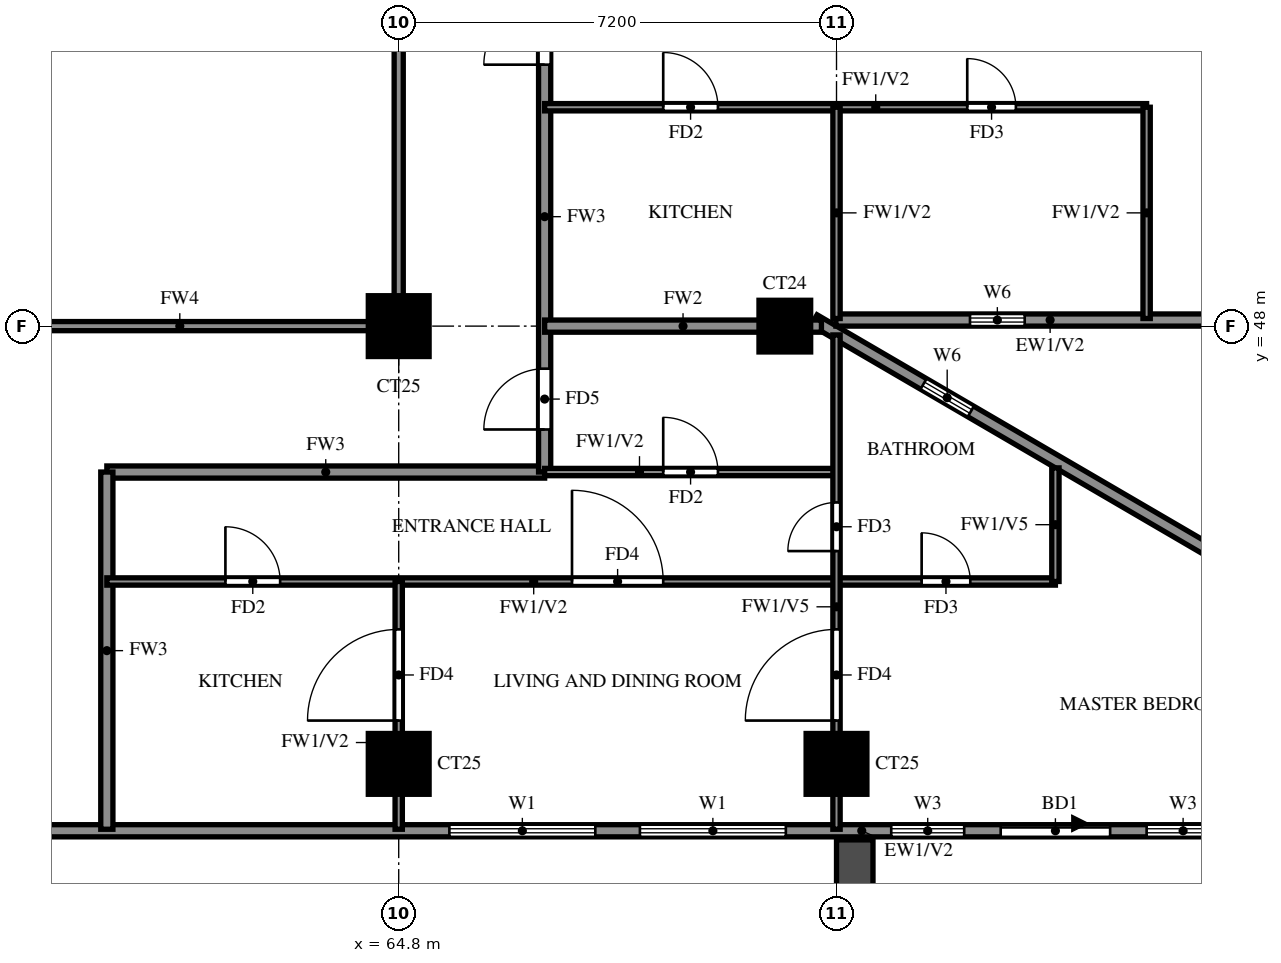
"""IFC4 building model, lengths in metres.
Left out: names, types, materials, properties, quantities, classifications, styles, units other than length and angle.
Written with IfcOpenShell. Run it as: python <this file> out.ifc"""

import sys

from ifc_helpers import new_model, si_unit, direction, frame, frame_2d, origin, origin_2d, place, context, subcontext, project, spatial, rectangle, extrude, source, transform, mapped, element, fill, save


model = new_model("IFC4")
c1 = context("Model", 3, precision=1e-05, world=origin(), true_north=direction((0.0, 1.0)))
c2 = subcontext(c1, "Body", "Model", "MODEL_VIEW")
j1 = project(units=[si_unit("LENGTHUNIT", "METRE"), si_unit("PLANEANGLEUNIT", "RADIAN")], contexts=[c1])
p1 = place(None, origin())
s1 = spatial("IfcSite", under=j1, at=p1, CompositionType="ELEMENT")
p2 = place(p1, origin())
s2 = spatial("IfcBuilding", under=s1, at=p2, CompositionType="ELEMENT")
p3 = place(p2, frame((0.0, 0.0, 150.0)))
s3 = spatial("IfcBuildingStorey", under=s2, at=p3, CompositionType="ELEMENT", Elevation=150.0)
m1 = source(origin(), c2, "Body", "SweptSolid", [
    extrude(rectangle(XDim=1.0, YDim=1.0, at=origin_2d()), origin(), (0.0, 0.0, 1.0), 3.2),
])
for number, where, z_axis, x_axis in (
    (1, (64.8, 40.8, 0.0), (0.0, 0.0, 1.0), (1.0, 0.0, 0.0)),
    (2, (72.0, 40.8, 0.0), (0.0, 0.0, 1.0), (1.0, 0.0, 0.0)),
    (3, (64.8, 48.0, 0.0), (0.0, 0.0, 1.0), (1.0, 0.0, 0.0)),
):
    element("IfcColumn", number, at=place(p3, frame(where, z_axis=z_axis, x_axis=x_axis)), inside=s3, PredefinedType="COLUMN", context=c2, shape_type="MappedRepresentation", body=[
        mapped(m1, transform((0.0, 0.0, 0.0))),
    ])
m2 = source(origin(), c2, "Body", "SweptSolid", [
    extrude(rectangle(XDim=0.85, YDim=0.85, at=origin_2d()), origin(), (0.0, 0.0, 1.0), 3.2),
])
p4 = place(p3, frame((71.15, 48.0, 0.0), z_axis=(0.0, 0.0, 1.0), x_axis=(1.0, 0.0, 0.0)))
e4 = element("IfcColumn", 4, at=p4, inside=s3, PredefinedType="COLUMN", context=c2, shape_type="MappedRepresentation", body=[
    mapped(m2, transform((0.0, 0.0, 0.0))),
])
p5 = place(p3, frame((85.719, 39.881, 0.0), z_axis=(0.0, 0.0, 1.0), x_axis=(-0.86377618652, 0.503875678716, 0.0)))
e5 = element("IfcWall", 5, at=p5, inside=s3, PredefinedType="SOLIDWALL", context=c2, shape_type="SweptSolid", body=[
    extrude(rectangle(XDim=16.311, YDim=0.2, at=frame_2d((8.156, 0.0))), origin(), (0.0, 0.0, 1.0), 3.2),
])
p6 = place(p5, frame((13.326, 0.0, 1.5)))
e6 = element("IfcOpeningElement", 6, at=p6, cuts=e5, PredefinedType="OPENING", context=c2, shape_type="SweptSolid", body=[
    extrude(rectangle(XDim=0.9, YDim=0.9, at=frame_2d((0.45, 0.45))), frame((0.0, 0.11, 0.0), z_axis=(0.0, -1.0, 0.0), x_axis=(1.0, 0.0, 0.0)), (0.0, 0.0, 1.0), 0.22),
])
p7 = place(p3, frame((71.99, 48.1, 0.0), z_axis=(0.0, 0.0, 1.0), x_axis=(1.0, 0.0, 0.0)))
e7 = element("IfcWall", 7, at=p7, inside=s3, PredefinedType="SOLIDWALL", context=c2, shape_type="SweptSolid", body=[
    extrude(rectangle(XDim=6.71, YDim=0.2, at=frame_2d((3.355, 0.0))), origin(), (0.0, 0.0, 1.0), 3.2),
])
p8 = place(p7, frame((2.205, 0.0, 1.5)))
e8 = element("IfcOpeningElement", 8, at=p8, cuts=e7, PredefinedType="OPENING", context=c2, shape_type="SweptSolid", body=[
    extrude(rectangle(XDim=0.9, YDim=0.9, at=frame_2d((0.45, 0.45))), frame((0.0, 0.11, 0.0), z_axis=(0.0, -1.0, 0.0), x_axis=(1.0, 0.0, 0.0)), (0.0, 0.0, 1.0), 0.22),
])
p9 = place(p3, frame((58.8, 39.7, 0.0), z_axis=(0.0, 0.0, 1.0), x_axis=(1.0, 0.0, 0.0)))
e9 = element("IfcWall", 9, at=p9, inside=s3, PredefinedType="SOLIDWALL", context=c2, shape_type="SweptSolid", body=[
    extrude(rectangle(XDim=27.23, YDim=0.2, at=frame_2d((13.615, 0.0))), origin(), (0.0, 0.0, 1.0), 3.2),
])
p10 = place(p9, frame((15.9, 0.0, 0.0)))
e10 = element("IfcOpeningElement", 10, at=p10, cuts=e9, PredefinedType="OPENING", context=c2, shape_type="SweptSolid", body=[
    extrude(rectangle(XDim=1.8, YDim=2.4, at=frame_2d((0.9, 1.2))), frame((0.0, 0.11, 0.0), z_axis=(0.0, -1.0, 0.0), x_axis=(1.0, 0.0, 0.0)), (0.0, 0.0, 1.0), 0.22),
])
p11 = place(p9, frame((6.833, 0.0, 0.6)))
e11 = element("IfcOpeningElement", 11, at=p11, cuts=e9, PredefinedType="OPENING", context=c2, shape_type="SweptSolid", body=[
    extrude(rectangle(XDim=2.4, YDim=2.4, at=frame_2d((1.2, 1.2))), frame((0.0, 0.11, 0.0), z_axis=(0.0, -1.0, 0.0), x_axis=(1.0, 0.0, 0.0)), (0.0, 0.0, 1.0), 0.22),
])
p12 = place(p9, frame((9.967, 0.0, 0.6)))
e12 = element("IfcOpeningElement", 12, at=p12, cuts=e9, PredefinedType="OPENING", context=c2, shape_type="SweptSolid", body=[
    extrude(rectangle(XDim=2.4, YDim=2.4, at=frame_2d((1.2, 1.2))), frame((0.0, 0.11, 0.0), z_axis=(0.0, -1.0, 0.0), x_axis=(1.0, 0.0, 0.0)), (0.0, 0.0, 1.0), 0.22),
])
p13 = place(p9, frame((14.1, 0.0, 0.6)))
e13 = element("IfcOpeningElement", 13, at=p13, cuts=e9, PredefinedType="OPENING", context=c2, shape_type="SweptSolid", body=[
    extrude(rectangle(XDim=1.2, YDim=2.4, at=frame_2d((0.6, 1.2))), frame((0.0, 0.11, 0.0), z_axis=(0.0, -1.0, 0.0), x_axis=(1.0, 0.0, 0.0)), (0.0, 0.0, 1.0), 0.22),
])
p14 = place(p9, frame((18.3, 0.0, 0.6)))
e14 = element("IfcOpeningElement", 14, at=p14, cuts=e9, PredefinedType="OPENING", context=c2, shape_type="SweptSolid", body=[
    extrude(rectangle(XDim=1.2, YDim=2.4, at=frame_2d((0.6, 1.2))), frame((0.0, 0.11, 0.0), z_axis=(0.0, -1.0, 0.0), x_axis=(1.0, 0.0, 0.0)), (0.0, 0.0, 1.0), 0.22),
])
p15 = place(p9, frame((21.551, 0.0, 0.6)))
e15 = element("IfcOpeningElement", 15, at=p15, cuts=e9, PredefinedType="OPENING", context=c2, shape_type="SweptSolid", body=[
    extrude(rectangle(XDim=2.4, YDim=2.4, at=frame_2d((1.2, 1.2))), frame((0.0, 0.11, 0.0), z_axis=(0.0, -1.0, 0.0), x_axis=(1.0, 0.0, 0.0)), (0.0, 0.0, 1.0), 0.22),
])
p16 = place(p9, frame((25.99, 0.0, 0.6)))
e16 = element("IfcOpeningElement", 16, at=p16, cuts=e9, PredefinedType="OPENING", context=c2, shape_type="SweptSolid", body=[
    extrude(rectangle(XDim=0.9, YDim=2.4, at=frame_2d((0.45, 1.2))), frame((0.0, 0.11, 0.0), z_axis=(0.0, -1.0, 0.0), x_axis=(1.0, 0.0, 0.0)), (0.0, 0.0, 1.0), 0.22),
])
p17 = place(p3, frame((72.3, 39.55, 0.0), z_axis=(0.0, 0.0, 1.0), x_axis=(0.0, -1.0, 0.0)))
e17 = element("IfcWall", 17, at=p17, inside=s3, PredefinedType="SOLIDWALL", context=c2, shape_type="SweptSolid", body=[
    extrude(rectangle(XDim=2.65, YDim=0.6, at=frame_2d((1.325, 0.0))), origin(), (0.0, 0.0, 1.0), 2.85),
])
p18 = place(p3, frame((60.0, 45.6, 0.0), z_axis=(0.0, 0.0, 1.0), x_axis=(1.0, 0.0, 0.0)))
e18 = element("IfcWall", 18, at=p18, inside=s3, PredefinedType="SOLIDWALL", context=c2, shape_type="SweptSolid", body=[
    extrude(rectangle(XDim=7.2, YDim=0.2, at=frame_2d((3.6, 0.0))), origin(), (0.0, 0.0, 1.0), 3.2),
])
p19 = place(p3, frame((60.0, 39.725, 0.0), z_axis=(0.0, 0.0, 1.0), x_axis=(0.0, 1.0, 0.0)))
e19 = element("IfcWall", 19, at=p19, inside=s3, PredefinedType="SOLIDWALL", context=c2, shape_type="SweptSolid", body=[
    extrude(rectangle(XDim=5.875, YDim=0.2, at=frame_2d((2.938, 0.0))), origin(), (0.0, 0.0, 1.0), 3.2),
])
p20 = place(p3, frame((67.2, 45.6, 0.0), z_axis=(0.0, 0.0, 1.0), x_axis=(0.0, 1.0, 0.0)))
e20 = element("IfcWall", 20, at=p20, inside=s3, PredefinedType="SOLIDWALL", context=c2, shape_type="SweptSolid", body=[
    extrude(rectangle(XDim=8.4, YDim=0.2, at=frame_2d((4.2, 0.0))), origin(), (0.0, 0.0, 1.0), 3.2),
])
p21 = place(p20, frame((6.7, 0.0, 0.0)))
e21 = element("IfcOpeningElement", 21, at=p21, cuts=e20, PredefinedType="OPENING", context=c2, shape_type="SweptSolid", body=[
    extrude(rectangle(XDim=1.0, YDim=2.1, at=frame_2d((0.5, 1.05))), frame((0.0, 0.11, 0.0), z_axis=(0.0, -1.0, 0.0), x_axis=(1.0, 0.0, 0.0)), (0.0, 0.0, 1.0), 0.22),
])
p22 = place(p20, frame((0.7, 0.0, 0.0)))
e22 = element("IfcOpeningElement", 22, at=p22, cuts=e20, PredefinedType="OPENING", context=c2, shape_type="SweptSolid", body=[
    extrude(rectangle(XDim=1.0, YDim=2.1, at=frame_2d((0.5, 1.05))), frame((0.0, 0.11, 0.0), z_axis=(0.0, -1.0, 0.0), x_axis=(1.0, 0.0, 0.0)), (0.0, 0.0, 1.0), 0.22),
])
p23 = place(p3, frame((67.2, 48.0, 0.0), z_axis=(0.0, 0.0, 1.0), x_axis=(1.0, 0.0, 0.0)))
e23 = element("IfcWall", 23, at=p23, inside=s3, PredefinedType="SOLIDWALL", context=c2, shape_type="SweptSolid", body=[
    extrude(rectangle(XDim=4.552, YDim=0.2, at=frame_2d((2.276, 0.0))), origin(), (0.0, 0.0, 1.0), 3.2),
])
p24 = place(p3, frame((60.0, 43.8, 0.0), z_axis=(0.0, 0.0, 1.0), x_axis=(1.0, 0.0, 0.0)))
e24 = element("IfcWall", 24, at=p24, inside=s3, PredefinedType="PARTITIONING", context=c2, shape_type="SweptSolid", body=[
    extrude(rectangle(XDim=15.6, YDim=0.12, at=frame_2d((7.8, 0.0))), origin(), (0.0, 0.0, 1.0), 3.2),
])
p25 = place(p24, frame((7.65, 0.0, 0.0)))
e25 = element("IfcOpeningElement", 25, at=p25, cuts=e24, PredefinedType="OPENING", context=c2, shape_type="SweptSolid", body=[
    extrude(rectangle(XDim=1.5, YDim=2.1, at=frame_2d((0.75, 1.05))), frame((0.0, 0.07, 0.0), z_axis=(0.0, -1.0, 0.0), x_axis=(1.0, 0.0, 0.0)), (0.0, 0.0, 1.0), 0.14),
])
p26 = place(p24, frame((1.95, 0.0, 0.0)))
e26 = element("IfcOpeningElement", 26, at=p26, cuts=e24, PredefinedType="OPENING", context=c2, shape_type="SweptSolid", body=[
    extrude(rectangle(XDim=0.9, YDim=2.1, at=frame_2d((0.45, 1.05))), frame((0.0, 0.07, 0.0), z_axis=(0.0, -1.0, 0.0), x_axis=(1.0, 0.0, 0.0)), (0.0, 0.0, 1.0), 0.14),
])
p27 = place(p24, frame((13.4, 0.0, 0.0)))
e27 = element("IfcOpeningElement", 27, at=p27, cuts=e24, PredefinedType="OPENING", context=c2, shape_type="SweptSolid", body=[
    extrude(rectangle(XDim=0.8, YDim=2.1, at=frame_2d((0.4, 1.05))), frame((0.0, 0.07, 0.0), z_axis=(0.0, -1.0, 0.0), x_axis=(1.0, 0.0, 0.0)), (0.0, 0.0, 1.0), 0.14),
])
p28 = place(p3, frame((67.2, 45.6, 0.0), z_axis=(0.0, 0.0, 1.0), x_axis=(1.0, 0.0, 0.0)))
e28 = element("IfcWall", 28, at=p28, inside=s3, PredefinedType="PARTITIONING", context=c2, shape_type="SweptSolid", body=[
    extrude(rectangle(XDim=4.8, YDim=0.12, at=frame_2d((2.4, 0.0))), origin(), (0.0, 0.0, 1.0), 3.2),
])
p29 = place(p28, frame((1.95, 0.0, 0.0)))
e29 = element("IfcOpeningElement", 29, at=p29, cuts=e28, PredefinedType="OPENING", context=c2, shape_type="SweptSolid", body=[
    extrude(rectangle(XDim=0.9, YDim=2.1, at=frame_2d((0.45, 1.05))), frame((0.0, 0.07, 0.0), z_axis=(0.0, -1.0, 0.0), x_axis=(1.0, 0.0, 0.0)), (0.0, 0.0, 1.0), 0.14),
])
p30 = place(p3, frame((67.2, 51.6, 0.0), z_axis=(0.0, 0.0, 1.0), x_axis=(1.0, 0.0, 0.0)))
e30 = element("IfcWall", 30, at=p30, inside=s3, PredefinedType="PARTITIONING", context=c2, shape_type="SweptSolid", body=[
    extrude(rectangle(XDim=9.9, YDim=0.12, at=frame_2d((4.95, 0.0))), origin(), (0.0, 0.0, 1.0), 3.2),
])
p31 = place(p30, frame((6.95, 0.0, 0.0)))
e31 = element("IfcOpeningElement", 31, at=p31, cuts=e30, PredefinedType="OPENING", context=c2, shape_type="SweptSolid", body=[
    extrude(rectangle(XDim=0.8, YDim=2.1, at=frame_2d((0.4, 1.05))), frame((0.0, 0.07, 0.0), z_axis=(0.0, -1.0, 0.0), x_axis=(1.0, 0.0, 0.0)), (0.0, 0.0, 1.0), 0.14),
])
p32 = place(p30, frame((1.95, 0.0, 0.0)))
e32 = element("IfcOpeningElement", 32, at=p32, cuts=e30, PredefinedType="OPENING", context=c2, shape_type="SweptSolid", body=[
    extrude(rectangle(XDim=0.9, YDim=2.1, at=frame_2d((0.45, 1.05))), frame((0.0, 0.07, 0.0), z_axis=(0.0, -1.0, 0.0), x_axis=(1.0, 0.0, 0.0)), (0.0, 0.0, 1.0), 0.14),
])
p33 = place(p3, frame((64.8, 39.725, 0.0), z_axis=(0.0, 0.0, 1.0), x_axis=(0.0, 1.0, 0.0)))
e33 = element("IfcWall", 33, at=p33, inside=s3, PredefinedType="PARTITIONING", context=c2, shape_type="SweptSolid", body=[
    extrude(rectangle(XDim=4.075, YDim=0.12, at=frame_2d((2.038, 0.0))), origin(), (0.0, 0.0, 1.0), 3.2),
])
p34 = place(p33, frame((1.788, 0.0, 0.0)))
e34 = element("IfcOpeningElement", 34, at=p34, cuts=e33, PredefinedType="OPENING", context=c2, shape_type="SweptSolid", body=[
    extrude(rectangle(XDim=1.5, YDim=2.1, at=frame_2d((0.75, 1.05))), frame((0.0, 0.07, 0.0), z_axis=(0.0, -1.0, 0.0), x_axis=(1.0, 0.0, 0.0)), (0.0, 0.0, 1.0), 0.14),
])
p35 = place(p3, frame((72.0, 39.725, 0.0), z_axis=(0.0, 0.0, 1.0), x_axis=(0.0, 1.0, 0.0)))
e35 = element("IfcWall", 35, at=p35, inside=s3, PredefinedType="PARTITIONING", context=c2, shape_type="SweptSolid", body=[
    extrude(rectangle(XDim=8.13, YDim=0.12, at=frame_2d((4.065, 0.0))), origin(), (0.0, 0.0, 1.0), 2.3),
])
p36 = place(p35, frame((1.788, 0.0, 0.0)))
e36 = element("IfcOpeningElement", 36, at=p36, cuts=e35, PredefinedType="OPENING", context=c2, shape_type="SweptSolid", body=[
    extrude(rectangle(XDim=1.5, YDim=2.1, at=frame_2d((0.75, 1.05))), frame((0.0, 0.07, 0.0), z_axis=(0.0, -1.0, 0.0), x_axis=(1.0, 0.0, 0.0)), (0.0, 0.0, 1.0), 0.14),
])
p37 = place(p35, frame((4.575, 0.0, 0.0)))
e37 = element("IfcOpeningElement", 37, at=p37, cuts=e35, PredefinedType="OPENING", context=c2, shape_type="SweptSolid", body=[
    extrude(rectangle(XDim=0.8, YDim=2.1, at=frame_2d((0.4, 1.05))), frame((0.0, 0.07, 0.0), z_axis=(0.0, -1.0, 0.0), x_axis=(1.0, 0.0, 0.0)), (0.0, 0.0, 1.0), 0.14),
])
p38 = place(p3, frame((72.0, 48.125, 0.0), z_axis=(0.0, 0.0, 1.0), x_axis=(0.0, 1.0, 0.0)))
e38 = element("IfcWall", 38, at=p38, inside=s3, PredefinedType="PARTITIONING", context=c2, shape_type="SweptSolid", body=[
    extrude(rectangle(XDim=3.475, YDim=0.12, at=frame_2d((1.738, 0.0))), origin(), (0.0, 0.0, 1.0), 3.2),
])
p39 = place(p3, frame((75.6, 43.8, 0.0), z_axis=(0.0, 0.0, 1.0), x_axis=(0.0, 1.0, 0.0)))
e39 = element("IfcWall", 39, at=p39, inside=s3, PredefinedType="PARTITIONING", context=c2, shape_type="SweptSolid", body=[
    extrude(rectangle(XDim=1.868, YDim=0.12, at=frame_2d((0.934, 0.0))), origin(), (0.0, 0.0, 1.0), 2.3),
])
p40 = place(p3, frame((77.1, 48.125, 0.0), z_axis=(0.0, 0.0, 1.0), x_axis=(0.0, 1.0, 0.0)))
e40 = element("IfcWall", 40, at=p40, inside=s3, PredefinedType="PARTITIONING", context=c2, shape_type="SweptSolid", body=[
    extrude(rectangle(XDim=3.475, YDim=0.12, at=frame_2d((1.738, 0.0))), origin(), (0.0, 0.0, 1.0), 3.2),
])
p41 = place(p3, frame((57.6, 48.0, 0.0), z_axis=(0.0, 0.0, 1.0), x_axis=(1.0, 0.0, 0.0)))
e41 = element("IfcWall", 41, at=p41, inside=s3, PredefinedType="SOLIDWALL", context=c2, shape_type="SweptSolid", body=[
    extrude(rectangle(XDim=7.2, YDim=0.15, at=frame_2d((3.6, 0.0))), origin(), (0.0, 0.0, 1.0), 2.3),
])
p42 = place(p3, frame((64.8, 48.0, 0.0), z_axis=(0.0, 0.0, 1.0), x_axis=(0.0, 1.0, 0.0)))
e42 = element("IfcWall", 42, at=p42, inside=s3, PredefinedType="SOLIDWALL", context=c2, shape_type="SweptSolid", body=[
    extrude(rectangle(XDim=14.4, YDim=0.15, at=frame_2d((7.2, 0.0))), origin(), (0.0, 0.0, 1.0), 2.3),
])
p43 = place(p6, origin())
e43 = element("IfcWindow", 43, at=p43, inside=s3, PartitioningType="SINGLE_PANEL", PredefinedType="WINDOW", context=c2, shape_type="SweptSolid", body=[
    extrude(rectangle(XDim=0.9, YDim=0.9, at=frame_2d((0.45, 0.45))), frame((0.0, 0.03, 0.0), z_axis=(0.0, -1.0, 0.0), x_axis=(1.0, 0.0, 0.0)), (0.0, 0.0, 1.0), 0.06),
])
fill(e6, e43)
p44 = place(p8, origin())
e44 = element("IfcWindow", 44, at=p44, inside=s3, PartitioningType="SINGLE_PANEL", PredefinedType="WINDOW", context=c2, shape_type="SweptSolid", body=[
    extrude(rectangle(XDim=0.9, YDim=0.9, at=frame_2d((0.45, 0.45))), frame((0.0, 0.03, 0.0), z_axis=(0.0, -1.0, 0.0), x_axis=(1.0, 0.0, 0.0)), (0.0, 0.0, 1.0), 0.06),
])
fill(e8, e44)
p45 = place(p10, origin())
e45 = element("IfcDoor", 45, at=p45, inside=s3, OperationType="DOUBLE_DOOR_SLIDING", PredefinedType="DOOR", context=c2, shape_type="SweptSolid", body=[
    extrude(rectangle(XDim=1.8, YDim=2.4, at=frame_2d((0.9, 1.2))), frame((0.0, 0.025, 0.0), z_axis=(0.0, -1.0, 0.0), x_axis=(1.0, 0.0, 0.0)), (0.0, 0.0, 1.0), 0.05),
])
fill(e10, e45)
p46 = place(p11, origin())
e46 = element("IfcWindow", 46, at=p46, inside=s3, PartitioningType="DOUBLE_PANEL_VERTICAL", PredefinedType="WINDOW", context=c2, shape_type="SweptSolid", body=[
    extrude(rectangle(XDim=2.4, YDim=2.4, at=frame_2d((1.2, 1.2))), frame((0.0, 0.03, 0.0), z_axis=(0.0, -1.0, 0.0), x_axis=(1.0, 0.0, 0.0)), (0.0, 0.0, 1.0), 0.06),
])
fill(e11, e46)
p47 = place(p12, origin())
e47 = element("IfcWindow", 47, at=p47, inside=s3, PartitioningType="DOUBLE_PANEL_VERTICAL", PredefinedType="WINDOW", context=c2, shape_type="SweptSolid", body=[
    extrude(rectangle(XDim=2.4, YDim=2.4, at=frame_2d((1.2, 1.2))), frame((0.0, 0.03, 0.0), z_axis=(0.0, -1.0, 0.0), x_axis=(1.0, 0.0, 0.0)), (0.0, 0.0, 1.0), 0.06),
])
fill(e12, e47)
p48 = place(p13, origin())
e48 = element("IfcWindow", 48, at=p48, inside=s3, PartitioningType="SINGLE_PANEL", PredefinedType="WINDOW", context=c2, shape_type="SweptSolid", body=[
    extrude(rectangle(XDim=1.2, YDim=2.4, at=frame_2d((0.6, 1.2))), frame((0.0, 0.03, 0.0), z_axis=(0.0, -1.0, 0.0), x_axis=(1.0, 0.0, 0.0)), (0.0, 0.0, 1.0), 0.06),
])
fill(e13, e48)
p49 = place(p14, origin())
e49 = element("IfcWindow", 49, at=p49, inside=s3, PartitioningType="SINGLE_PANEL", PredefinedType="WINDOW", context=c2, shape_type="SweptSolid", body=[
    extrude(rectangle(XDim=1.2, YDim=2.4, at=frame_2d((0.6, 1.2))), frame((0.0, 0.03, 0.0), z_axis=(0.0, -1.0, 0.0), x_axis=(1.0, 0.0, 0.0)), (0.0, 0.0, 1.0), 0.06),
])
fill(e14, e49)
p50 = place(p21, origin())
e50 = element("IfcDoor", 50, at=p50, inside=s3, OperationType="SINGLE_SWING_RIGHT", PredefinedType="DOOR", context=c2, shape_type="SweptSolid", body=[
    extrude(rectangle(XDim=1.0, YDim=2.1, at=frame_2d((0.5, 1.05))), frame((0.0, 0.025, 0.0), z_axis=(0.0, -1.0, 0.0), x_axis=(1.0, 0.0, 0.0)), (0.0, 0.0, 1.0), 0.05),
])
fill(e21, e50)
p51 = place(p31, origin())
e51 = element("IfcDoor", 51, at=p51, inside=s3, OperationType="SINGLE_SWING_RIGHT", PredefinedType="DOOR", context=c2, shape_type="SweptSolid", body=[
    extrude(rectangle(XDim=0.8, YDim=2.1, at=frame_2d((0.4, 1.05))), frame((0.0, 0.025, 0.0), z_axis=(0.0, -1.0, 0.0), x_axis=(1.0, 0.0, 0.0)), (0.0, 0.0, 1.0), 0.05),
])
fill(e31, e51)
p52 = place(p32, origin())
e52 = element("IfcDoor", 52, at=p52, inside=s3, OperationType="SINGLE_SWING_LEFT", PredefinedType="DOOR", context=c2, shape_type="SweptSolid", body=[
    extrude(rectangle(XDim=0.9, YDim=2.1, at=frame_2d((0.45, 1.05))), frame((0.0, 0.025, 0.0), z_axis=(0.0, -1.0, 0.0), x_axis=(1.0, 0.0, 0.0)), (0.0, 0.0, 1.0), 0.05),
])
fill(e32, e52)
p53 = place(p34, origin())
e53 = element("IfcDoor", 53, at=p53, inside=s3, OperationType="SINGLE_SWING_RIGHT", PredefinedType="DOOR", context=c2, shape_type="SweptSolid", body=[
    extrude(rectangle(XDim=1.5, YDim=2.1, at=frame_2d((0.75, 1.05))), frame((0.0, 0.025, 0.0), z_axis=(0.0, -1.0, 0.0), x_axis=(1.0, 0.0, 0.0)), (0.0, 0.0, 1.0), 0.05),
])
fill(e34, e53)
p54 = place(p29, origin())
e54 = element("IfcDoor", 54, at=p54, inside=s3, OperationType="SINGLE_SWING_LEFT", PredefinedType="DOOR", context=c2, shape_type="SweptSolid", body=[
    extrude(rectangle(XDim=0.9, YDim=2.1, at=frame_2d((0.45, 1.05))), frame((0.0, 0.025, 0.0), z_axis=(0.0, -1.0, 0.0), x_axis=(1.0, 0.0, 0.0)), (0.0, 0.0, 1.0), 0.05),
])
fill(e29, e54)
p55 = place(p22, origin())
e55 = element("IfcDoor", 55, at=p55, inside=s3, OperationType="SINGLE_SWING_RIGHT", PredefinedType="DOOR", context=c2, shape_type="SweptSolid", body=[
    extrude(rectangle(XDim=1.0, YDim=2.1, at=frame_2d((0.5, 1.05))), frame((0.0, 0.025, 0.0), z_axis=(0.0, -1.0, 0.0), x_axis=(1.0, 0.0, 0.0)), (0.0, 0.0, 1.0), 0.05),
])
fill(e22, e55)
p56 = place(p25, origin())
e56 = element("IfcDoor", 56, at=p56, inside=s3, OperationType="SINGLE_SWING_LEFT", PredefinedType="DOOR", context=c2, shape_type="SweptSolid", body=[
    extrude(rectangle(XDim=1.5, YDim=2.1, at=frame_2d((0.75, 1.05))), frame((0.0, 0.025, 0.0), z_axis=(0.0, -1.0, 0.0), x_axis=(1.0, 0.0, 0.0)), (0.0, 0.0, 1.0), 0.05),
])
fill(e25, e56)
p57 = place(p26, origin())
e57 = element("IfcDoor", 57, at=p57, inside=s3, OperationType="SINGLE_SWING_LEFT", PredefinedType="DOOR", context=c2, shape_type="SweptSolid", body=[
    extrude(rectangle(XDim=0.9, YDim=2.1, at=frame_2d((0.45, 1.05))), frame((0.0, 0.025, 0.0), z_axis=(0.0, -1.0, 0.0), x_axis=(1.0, 0.0, 0.0)), (0.0, 0.0, 1.0), 0.05),
])
fill(e26, e57)
p58 = place(p36, origin())
e58 = element("IfcDoor", 58, at=p58, inside=s3, OperationType="SINGLE_SWING_LEFT", PredefinedType="DOOR", context=c2, shape_type="SweptSolid", body=[
    extrude(rectangle(XDim=1.5, YDim=2.1, at=frame_2d((0.75, 1.05))), frame((0.0, 0.025, 0.0), z_axis=(0.0, -1.0, 0.0), x_axis=(1.0, 0.0, 0.0)), (0.0, 0.0, 1.0), 0.05),
])
fill(e36, e58)
p59 = place(p37, origin())
e59 = element("IfcDoor", 59, at=p59, inside=s3, OperationType="SINGLE_SWING_LEFT", PredefinedType="DOOR", context=c2, shape_type="SweptSolid", body=[
    extrude(rectangle(XDim=0.8, YDim=2.1, at=frame_2d((0.4, 1.05))), frame((0.0, 0.025, 0.0), z_axis=(0.0, -1.0, 0.0), x_axis=(1.0, 0.0, 0.0)), (0.0, 0.0, 1.0), 0.05),
])
fill(e37, e59)
p60 = place(p27, origin())
e60 = element("IfcDoor", 60, at=p60, inside=s3, OperationType="SINGLE_SWING_LEFT", PredefinedType="DOOR", context=c2, shape_type="SweptSolid", body=[
    extrude(rectangle(XDim=0.8, YDim=2.1, at=frame_2d((0.4, 1.05))), frame((0.0, 0.025, 0.0), z_axis=(0.0, -1.0, 0.0), x_axis=(1.0, 0.0, 0.0)), (0.0, 0.0, 1.0), 0.05),
])
fill(e27, e60)
save(model, sys.argv[1])
